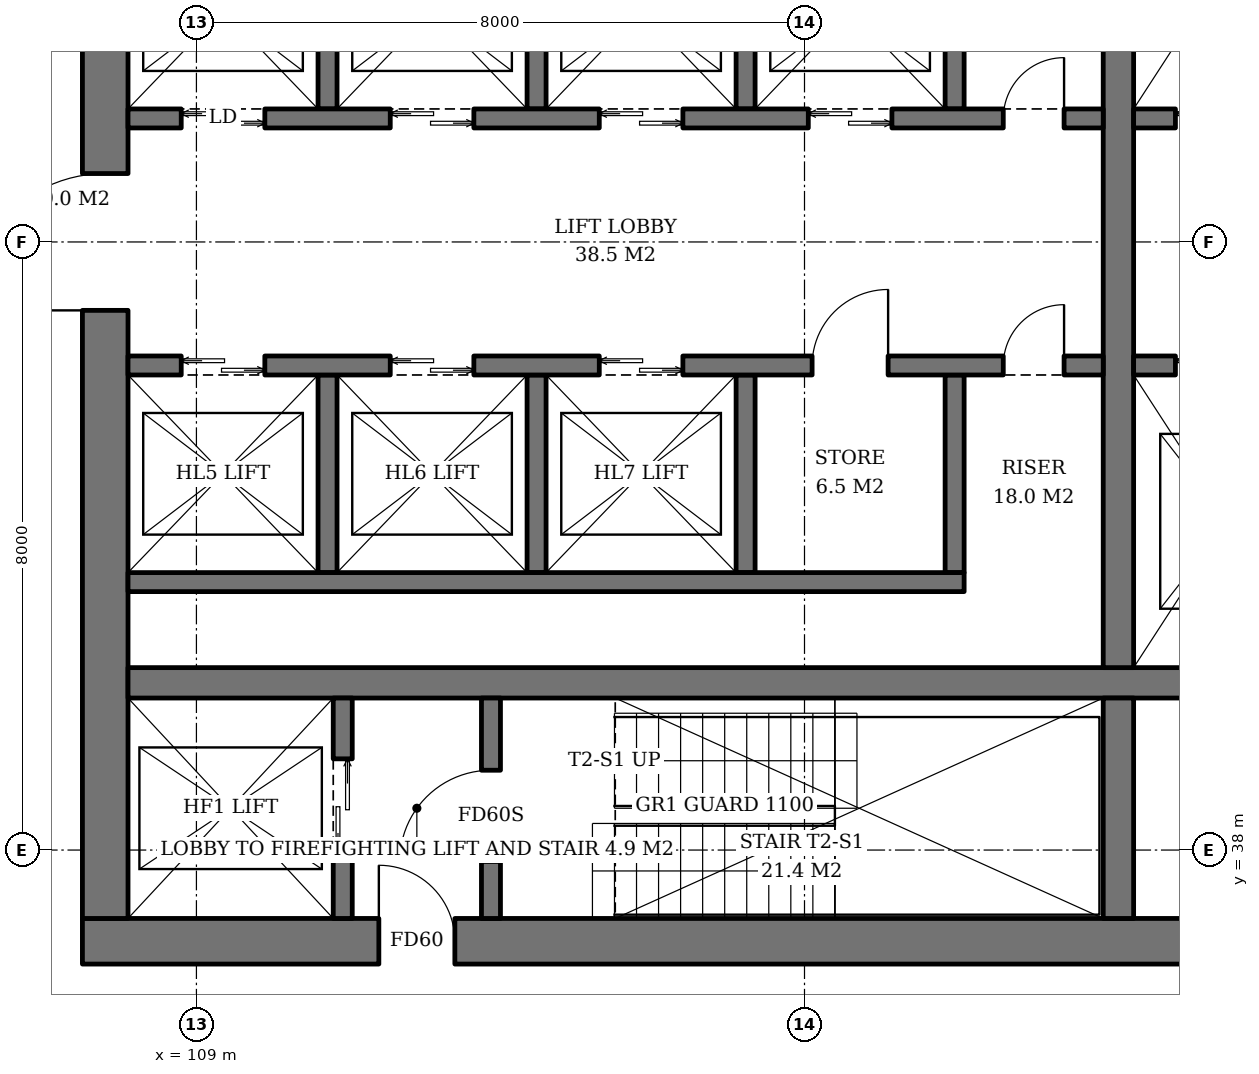
"""IFC4 building model, lengths in metres.
Left out: names, types, materials, properties, quantities, classifications, styles, units other than length and angle.
Written with IfcOpenShell. Run it as: python <this file> out.ifc"""

import sys

from ifc_helpers import new_model, si_unit, direction, frame, frame_2d, origin, place, context, subcontext, project, spatial, rectangle, extrude, element, fill, save


model = new_model("IFC4")
c1 = context("Model", 3, precision=1e-05, world=origin(), true_north=direction((0.0, 1.0)))
c2 = subcontext(c1, "Body", "Model", "MODEL_VIEW")
j1 = project(units=[si_unit("LENGTHUNIT", "METRE"), si_unit("PLANEANGLEUNIT", "RADIAN")], contexts=[c1])
p1 = place(None, origin())
s1 = spatial("IfcSite", under=j1, at=p1, CompositionType="ELEMENT")
p2 = place(p1, origin())
s2 = spatial("IfcBuilding", under=s1, at=p2, CompositionType="ELEMENT")
p3 = place(p2, frame((0.0, 0.0, 123.6)))
s3 = spatial("IfcBuildingStorey", under=s2, at=p3, CompositionType="ELEMENT", Elevation=123.6)
p4 = place(p3, frame((107.5, 36.8, 0.0), z_axis=(0.0, 0.0, 1.0), x_axis=(1.0, 0.0, 0.0)))
e1 = element("IfcWall", 1, at=p4, inside=s3, PredefinedType="SHEAR", context=c2, shape_type="SweptSolid", body=[
    extrude(rectangle(XDim=19.0, YDim=0.6, at=frame_2d((9.5, 0.0))), origin(), (0.0, 0.0, 1.0), 3.8),
])
p5 = place(p4, frame((3.9, 0.0, 0.0)))
e2 = element("IfcOpeningElement", 2, at=p5, cuts=e1, PredefinedType="OPENING", context=c2, shape_type="SweptSolid", body=[
    extrude(rectangle(XDim=1.0, YDim=2.1, at=frame_2d((0.5, 1.05))), frame((0.0, 0.31, 0.0), z_axis=(0.0, -1.0, 0.0), x_axis=(1.0, 0.0, 0.0)), (0.0, 0.0, 1.0), 0.62),
])
p6 = place(p4, frame((15.615, 0.0, 0.0)))
e3 = element("IfcOpeningElement", 3, at=p6, cuts=e1, PredefinedType="OPENING", context=c2, shape_type="SweptSolid", body=[
    extrude(rectangle(XDim=1.0, YDim=2.1, at=frame_2d((0.5, 1.05))), frame((0.0, 0.31, 0.0), z_axis=(0.0, -1.0, 0.0), x_axis=(1.0, 0.0, 0.0)), (0.0, 0.0, 1.0), 0.62),
])
p7 = place(p3, frame((107.8, 37.1, 0.0), z_axis=(0.0, 0.0, 1.0), x_axis=(0.0, 1.0, 0.0)))
e4 = element("IfcWall", 4, at=p7, inside=s3, PredefinedType="SHEAR", context=c2, shape_type="SweptSolid", body=[
    extrude(rectangle(XDim=17.8, YDim=0.6, at=frame_2d((8.9, 0.0))), origin(), (0.0, 0.0, 1.0), 3.8),
])
p8 = place(p7, frame((8.0, 0.0, 0.0)))
e5 = element("IfcOpeningElement", 5, at=p8, cuts=e4, PredefinedType="OPENING", context=c2, shape_type="SweptSolid", body=[
    extrude(rectangle(XDim=1.8, YDim=2.4, at=frame_2d((0.9, 1.2))), frame((0.0, 0.31, 0.0), z_axis=(0.0, -1.0, 0.0), x_axis=(1.0, 0.0, 0.0)), (0.0, 0.0, 1.0), 0.62),
])
p9 = place(p3, frame((108.1, 40.2, 0.0), z_axis=(0.0, 0.0, 1.0), x_axis=(1.0, 0.0, 0.0)))
e6 = element("IfcWall", 6, at=p9, inside=s3, PredefinedType="SHEAR", context=c2, shape_type="SweptSolid", body=[
    extrude(rectangle(XDim=17.8, YDim=0.4, at=frame_2d((8.9, 0.0))), origin(), (0.0, 0.0, 1.0), 3.8),
])
p10 = place(p3, frame((121.13, 37.1, 0.0), z_axis=(0.0, 0.0, 1.0), x_axis=(0.0, 1.0, 0.0)))
e7 = element("IfcWall", 7, at=p10, inside=s3, PredefinedType="SHEAR", context=c2, shape_type="SweptSolid", body=[
    extrude(rectangle(XDim=2.9, YDim=0.4, at=frame_2d((1.45, 0.0))), origin(), (0.0, 0.0, 1.0), 3.8),
])
p11 = place(p3, frame((121.13, 40.4, 0.0), z_axis=(0.0, 0.0, 1.0), x_axis=(0.0, 1.0, 0.0)))
e8 = element("IfcWall", 8, at=p11, inside=s3, PredefinedType="SHEAR", context=c2, shape_type="SweptSolid", body=[
    extrude(rectangle(XDim=11.2, YDim=0.4, at=frame_2d((5.6, 0.0))), origin(), (0.0, 0.0, 1.0), 3.8),
])
p12 = place(p3, frame((110.925, 37.1, 0.0), z_axis=(0.0, 0.0, 1.0), x_axis=(0.0, 1.0, 0.0)))
e9 = element("IfcWall", 9, at=p12, inside=s3, PredefinedType="SHEAR", context=c2, shape_type="SweptSolid", body=[
    extrude(rectangle(XDim=2.9, YDim=0.25, at=frame_2d((1.45, 0.0))), origin(), (0.0, 0.0, 1.0), 3.8),
])
p13 = place(p12, frame((0.8, 0.0, 0.0)))
e10 = element("IfcOpeningElement", 10, at=p13, cuts=e9, PredefinedType="OPENING", context=c2, shape_type="SweptSolid", body=[
    extrude(rectangle(XDim=1.3, YDim=2.2, at=frame_2d((0.65, 1.1))), frame((0.0, 0.135, 0.0), z_axis=(0.0, -1.0, 0.0), x_axis=(1.0, 0.0, 0.0)), (0.0, 0.0, 1.0), 0.27),
])
p14 = place(p3, frame((112.875, 37.1, 0.0), z_axis=(0.0, 0.0, 1.0), x_axis=(0.0, 1.0, 0.0)))
e11 = element("IfcWall", 11, at=p14, inside=s3, PredefinedType="SHEAR", context=c2, shape_type="SweptSolid", body=[
    extrude(rectangle(XDim=2.9, YDim=0.25, at=frame_2d((1.45, 0.0))), origin(), (0.0, 0.0, 1.0), 3.8),
])
p15 = place(p14, frame((0.75, 0.0, 0.0)))
e12 = element("IfcOpeningElement", 12, at=p15, cuts=e11, PredefinedType="OPENING", context=c2, shape_type="SweptSolid", body=[
    extrude(rectangle(XDim=1.2, YDim=2.1, at=frame_2d((0.6, 1.05))), frame((0.0, 0.135, 0.0), z_axis=(0.0, -1.0, 0.0), x_axis=(1.0, 0.0, 0.0)), (0.0, 0.0, 1.0), 0.27),
])
for number, where, z_axis, x_axis in (
    (13, (110.725, 47.75, 0.0), (0.0, 0.0, 1.0), (0.0, 1.0, 0.0)),
    (14, (113.475, 47.75, 0.0), (0.0, 0.0, 1.0), (0.0, 1.0, 0.0)),
    (15, (116.225, 47.75, 0.0), (0.0, 0.0, 1.0), (0.0, 1.0, 0.0)),
    (16, (118.975, 47.75, 0.0), (0.0, 0.0, 1.0), (0.0, 1.0, 0.0)),
):
    element("IfcWall", number, at=place(p3, frame(where, z_axis=z_axis, x_axis=x_axis)), inside=s3, PredefinedType="SHEAR", context=c2, shape_type="SweptSolid", body=[
        extrude(rectangle(XDim=2.6, YDim=0.25, at=frame_2d((1.3, 0.0))), origin(), (0.0, 0.0, 1.0), 3.8),
    ])
p16 = place(p3, frame((108.1, 47.625, 0.0), z_axis=(0.0, 0.0, 1.0), x_axis=(1.0, 0.0, 0.0)))
e17 = element("IfcWall", 17, at=p16, inside=s3, PredefinedType="SHEAR", context=c2, shape_type="SweptSolid", body=[
    extrude(rectangle(XDim=12.83, YDim=0.25, at=frame_2d((6.415, 0.0))), origin(), (0.0, 0.0, 1.0), 3.8),
])
p17 = place(p16, frame((0.7, 0.0, 0.0)))
e18 = element("IfcOpeningElement", 18, at=p17, cuts=e17, PredefinedType="OPENING", context=c2, shape_type="SweptSolid", body=[
    extrude(rectangle(XDim=1.1, YDim=2.2, at=frame_2d((0.55, 1.1))), frame((0.0, 0.135, 0.0), z_axis=(0.0, -1.0, 0.0), x_axis=(1.0, 0.0, 0.0)), (0.0, 0.0, 1.0), 0.27),
])
p18 = place(p16, frame((3.45, 0.0, 0.0)))
e19 = element("IfcOpeningElement", 19, at=p18, cuts=e17, PredefinedType="OPENING", context=c2, shape_type="SweptSolid", body=[
    extrude(rectangle(XDim=1.1, YDim=2.2, at=frame_2d((0.55, 1.1))), frame((0.0, 0.135, 0.0), z_axis=(0.0, -1.0, 0.0), x_axis=(1.0, 0.0, 0.0)), (0.0, 0.0, 1.0), 0.27),
])
p19 = place(p16, frame((6.2, 0.0, 0.0)))
e20 = element("IfcOpeningElement", 20, at=p19, cuts=e17, PredefinedType="OPENING", context=c2, shape_type="SweptSolid", body=[
    extrude(rectangle(XDim=1.1, YDim=2.2, at=frame_2d((0.55, 1.1))), frame((0.0, 0.135, 0.0), z_axis=(0.0, -1.0, 0.0), x_axis=(1.0, 0.0, 0.0)), (0.0, 0.0, 1.0), 0.27),
])
p20 = place(p16, frame((8.95, 0.0, 0.0)))
e21 = element("IfcOpeningElement", 21, at=p20, cuts=e17, PredefinedType="OPENING", context=c2, shape_type="SweptSolid", body=[
    extrude(rectangle(XDim=1.1, YDim=2.2, at=frame_2d((0.55, 1.1))), frame((0.0, 0.135, 0.0), z_axis=(0.0, -1.0, 0.0), x_axis=(1.0, 0.0, 0.0)), (0.0, 0.0, 1.0), 0.27),
])
p21 = place(p16, frame((11.515, 0.0, 0.0)))
e22 = element("IfcOpeningElement", 22, at=p21, cuts=e17, PredefinedType="OPENING", context=c2, shape_type="SweptSolid", body=[
    extrude(rectangle(XDim=0.8, YDim=2.0, at=frame_2d((0.4, 1.0))), frame((0.0, 0.135, 0.0), z_axis=(0.0, -1.0, 0.0), x_axis=(1.0, 0.0, 0.0)), (0.0, 0.0, 1.0), 0.27),
])
for number, where, z_axis, x_axis in (
    (23, (110.725, 44.25, 0.0), (0.0, 0.0, 1.0), (0.0, -1.0, 0.0)),
    (24, (113.475, 44.25, 0.0), (0.0, 0.0, 1.0), (0.0, -1.0, 0.0)),
    (25, (116.225, 44.25, 0.0), (0.0, 0.0, 1.0), (0.0, -1.0, 0.0)),
    (26, (118.975, 44.25, 0.0), (0.0, 0.0, 1.0), (0.0, -1.0, 0.0)),
):
    element("IfcWall", number, at=place(p3, frame(where, z_axis=z_axis, x_axis=x_axis)), inside=s3, PredefinedType="SHEAR", context=c2, shape_type="SweptSolid", body=[
        extrude(rectangle(XDim=2.6, YDim=0.25, at=frame_2d((1.3, 0.0))), origin(), (0.0, 0.0, 1.0), 3.8),
    ])
p22 = place(p3, frame((108.1, 41.525, 0.0), z_axis=(0.0, 0.0, 1.0), x_axis=(1.0, 0.0, 0.0)))
e27 = element("IfcWall", 27, at=p22, inside=s3, PredefinedType="SHEAR", context=c2, shape_type="SweptSolid", body=[
    extrude(rectangle(XDim=11.0, YDim=0.25, at=frame_2d((5.5, 0.0))), origin(), (0.0, 0.0, 1.0), 3.8),
])
p23 = place(p3, frame((108.1, 44.375, 0.0), z_axis=(0.0, 0.0, 1.0), x_axis=(1.0, 0.0, 0.0)))
e28 = element("IfcWall", 28, at=p23, inside=s3, PredefinedType="SHEAR", context=c2, shape_type="SweptSolid", body=[
    extrude(rectangle(XDim=12.83, YDim=0.25, at=frame_2d((6.415, 0.0))), origin(), (0.0, 0.0, 1.0), 3.8),
])
p24 = place(p23, frame((0.7, 0.0, 0.0)))
e29 = element("IfcOpeningElement", 29, at=p24, cuts=e28, PredefinedType="OPENING", context=c2, shape_type="SweptSolid", body=[
    extrude(rectangle(XDim=1.1, YDim=2.2, at=frame_2d((0.55, 1.1))), frame((0.0, 0.135, 0.0), z_axis=(0.0, -1.0, 0.0), x_axis=(1.0, 0.0, 0.0)), (0.0, 0.0, 1.0), 0.27),
])
p25 = place(p23, frame((3.45, 0.0, 0.0)))
e30 = element("IfcOpeningElement", 30, at=p25, cuts=e28, PredefinedType="OPENING", context=c2, shape_type="SweptSolid", body=[
    extrude(rectangle(XDim=1.1, YDim=2.2, at=frame_2d((0.55, 1.1))), frame((0.0, 0.135, 0.0), z_axis=(0.0, -1.0, 0.0), x_axis=(1.0, 0.0, 0.0)), (0.0, 0.0, 1.0), 0.27),
])
p26 = place(p23, frame((6.2, 0.0, 0.0)))
e31 = element("IfcOpeningElement", 31, at=p26, cuts=e28, PredefinedType="OPENING", context=c2, shape_type="SweptSolid", body=[
    extrude(rectangle(XDim=1.1, YDim=2.2, at=frame_2d((0.55, 1.1))), frame((0.0, 0.135, 0.0), z_axis=(0.0, -1.0, 0.0), x_axis=(1.0, 0.0, 0.0)), (0.0, 0.0, 1.0), 0.27),
])
p27 = place(p23, frame((9.0, 0.0, 0.0)))
e32 = element("IfcOpeningElement", 32, at=p27, cuts=e28, PredefinedType="OPENING", context=c2, shape_type="SweptSolid", body=[
    extrude(rectangle(XDim=1.0, YDim=2.1, at=frame_2d((0.5, 1.05))), frame((0.0, 0.135, 0.0), z_axis=(0.0, -1.0, 0.0), x_axis=(1.0, 0.0, 0.0)), (0.0, 0.0, 1.0), 0.27),
])
p28 = place(p23, frame((11.515, 0.0, 0.0)))
e33 = element("IfcOpeningElement", 33, at=p28, cuts=e28, PredefinedType="OPENING", context=c2, shape_type="SweptSolid", body=[
    extrude(rectangle(XDim=0.8, YDim=2.0, at=frame_2d((0.4, 1.0))), frame((0.0, 0.135, 0.0), z_axis=(0.0, -1.0, 0.0), x_axis=(1.0, 0.0, 0.0)), (0.0, 0.0, 1.0), 0.27),
])
p29 = place(p3, frame((121.33, 47.625, 0.0), z_axis=(0.0, 0.0, 1.0), x_axis=(1.0, 0.0, 0.0)))
e34 = element("IfcWall", 34, at=p29, inside=s3, PredefinedType="SHEAR", context=c2, shape_type="SweptSolid", body=[
    extrude(rectangle(XDim=4.57, YDim=0.25, at=frame_2d((2.285, 0.0))), origin(), (0.0, 0.0, 1.0), 3.8),
])
p30 = place(p29, frame((0.55, 0.0, 0.0)))
e35 = element("IfcOpeningElement", 35, at=p30, cuts=e34, PredefinedType="OPENING", context=c2, shape_type="SweptSolid", body=[
    extrude(rectangle(XDim=1.4, YDim=2.4, at=frame_2d((0.7, 1.2))), frame((0.0, 0.135, 0.0), z_axis=(0.0, -1.0, 0.0), x_axis=(1.0, 0.0, 0.0)), (0.0, 0.0, 1.0), 0.27),
])
p31 = place(p29, frame((3.26, 0.0, 0.0)))
e36 = element("IfcOpeningElement", 36, at=p31, cuts=e34, PredefinedType="OPENING", context=c2, shape_type="SweptSolid", body=[
    extrude(rectangle(XDim=0.8, YDim=2.0, at=frame_2d((0.4, 1.0))), frame((0.0, 0.135, 0.0), z_axis=(0.0, -1.0, 0.0), x_axis=(1.0, 0.0, 0.0)), (0.0, 0.0, 1.0), 0.27),
])
p32 = place(p3, frame((121.33, 44.375, 0.0), z_axis=(0.0, 0.0, 1.0), x_axis=(1.0, 0.0, 0.0)))
e37 = element("IfcWall", 37, at=p32, inside=s3, PredefinedType="SHEAR", context=c2, shape_type="SweptSolid", body=[
    extrude(rectangle(XDim=4.57, YDim=0.25, at=frame_2d((2.285, 0.0))), origin(), (0.0, 0.0, 1.0), 3.8),
])
p33 = place(p32, frame((0.55, 0.0, 0.0)))
e38 = element("IfcOpeningElement", 38, at=p33, cuts=e37, PredefinedType="OPENING", context=c2, shape_type="SweptSolid", body=[
    extrude(rectangle(XDim=1.4, YDim=2.4, at=frame_2d((0.7, 1.2))), frame((0.0, 0.135, 0.0), z_axis=(0.0, -1.0, 0.0), x_axis=(1.0, 0.0, 0.0)), (0.0, 0.0, 1.0), 0.27),
])
p34 = place(p32, frame((3.26, 0.0, 0.0)))
e39 = element("IfcOpeningElement", 39, at=p34, cuts=e37, PredefinedType="OPENING", context=c2, shape_type="SweptSolid", body=[
    extrude(rectangle(XDim=0.8, YDim=2.0, at=frame_2d((0.4, 1.0))), frame((0.0, 0.135, 0.0), z_axis=(0.0, -1.0, 0.0), x_axis=(1.0, 0.0, 0.0)), (0.0, 0.0, 1.0), 0.27),
])
p35 = place(p13, origin())
e40 = element("IfcDoor", 40, at=p35, inside=s3, OperationType="DOUBLE_DOOR_SLIDING", PredefinedType="DOOR", context=c2, shape_type="SweptSolid", body=[
    extrude(rectangle(XDim=1.3, YDim=2.2, at=frame_2d((0.65, 1.1))), frame((0.0, 0.025, 0.0), z_axis=(0.0, -1.0, 0.0), x_axis=(1.0, 0.0, 0.0)), (0.0, 0.0, 1.0), 0.05),
])
fill(e10, e40)
p36 = place(p15, origin())
e41 = element("IfcDoor", 41, at=p36, inside=s3, OperationType="SINGLE_SWING_LEFT", PredefinedType="DOOR", context=c2, shape_type="SweptSolid", body=[
    extrude(rectangle(XDim=1.2, YDim=2.1, at=frame_2d((0.6, 1.05))), frame((0.0, 0.025, 0.0), z_axis=(0.0, -1.0, 0.0), x_axis=(1.0, 0.0, 0.0)), (0.0, 0.0, 1.0), 0.05),
])
fill(e12, e41)
p37 = place(p17, origin())
e42 = element("IfcDoor", 42, at=p37, inside=s3, OperationType="DOUBLE_DOOR_SLIDING", PredefinedType="DOOR", context=c2, shape_type="SweptSolid", body=[
    extrude(rectangle(XDim=1.1, YDim=2.2, at=frame_2d((0.55, 1.1))), frame((0.0, 0.025, 0.0), z_axis=(0.0, -1.0, 0.0), x_axis=(1.0, 0.0, 0.0)), (0.0, 0.0, 1.0), 0.05),
])
fill(e18, e42)
p38 = place(p18, origin())
e43 = element("IfcDoor", 43, at=p38, inside=s3, OperationType="DOUBLE_DOOR_SLIDING", PredefinedType="DOOR", context=c2, shape_type="SweptSolid", body=[
    extrude(rectangle(XDim=1.1, YDim=2.2, at=frame_2d((0.55, 1.1))), frame((0.0, 0.025, 0.0), z_axis=(0.0, -1.0, 0.0), x_axis=(1.0, 0.0, 0.0)), (0.0, 0.0, 1.0), 0.05),
])
fill(e19, e43)
p39 = place(p19, origin())
e44 = element("IfcDoor", 44, at=p39, inside=s3, OperationType="DOUBLE_DOOR_SLIDING", PredefinedType="DOOR", context=c2, shape_type="SweptSolid", body=[
    extrude(rectangle(XDim=1.1, YDim=2.2, at=frame_2d((0.55, 1.1))), frame((0.0, 0.025, 0.0), z_axis=(0.0, -1.0, 0.0), x_axis=(1.0, 0.0, 0.0)), (0.0, 0.0, 1.0), 0.05),
])
fill(e20, e44)
p40 = place(p20, origin())
e45 = element("IfcDoor", 45, at=p40, inside=s3, OperationType="DOUBLE_DOOR_SLIDING", PredefinedType="DOOR", context=c2, shape_type="SweptSolid", body=[
    extrude(rectangle(XDim=1.1, YDim=2.2, at=frame_2d((0.55, 1.1))), frame((0.0, 0.025, 0.0), z_axis=(0.0, -1.0, 0.0), x_axis=(1.0, 0.0, 0.0)), (0.0, 0.0, 1.0), 0.05),
])
fill(e21, e45)
p41 = place(p21, origin())
e46 = element("IfcDoor", 46, at=p41, inside=s3, OperationType="SINGLE_SWING_RIGHT", PredefinedType="DOOR", context=c2, shape_type="SweptSolid", body=[
    extrude(rectangle(XDim=0.8, YDim=2.0, at=frame_2d((0.4, 1.0))), frame((0.0, 0.025, 0.0), z_axis=(0.0, -1.0, 0.0), x_axis=(1.0, 0.0, 0.0)), (0.0, 0.0, 1.0), 0.05),
])
fill(e22, e46)
p42 = place(p24, origin())
e47 = element("IfcDoor", 47, at=p42, inside=s3, OperationType="DOUBLE_DOOR_SLIDING", PredefinedType="DOOR", context=c2, shape_type="SweptSolid", body=[
    extrude(rectangle(XDim=1.1, YDim=2.2, at=frame_2d((0.55, 1.1))), frame((0.0, 0.025, 0.0), z_axis=(0.0, -1.0, 0.0), x_axis=(1.0, 0.0, 0.0)), (0.0, 0.0, 1.0), 0.05),
])
fill(e29, e47)
p43 = place(p25, origin())
e48 = element("IfcDoor", 48, at=p43, inside=s3, OperationType="DOUBLE_DOOR_SLIDING", PredefinedType="DOOR", context=c2, shape_type="SweptSolid", body=[
    extrude(rectangle(XDim=1.1, YDim=2.2, at=frame_2d((0.55, 1.1))), frame((0.0, 0.025, 0.0), z_axis=(0.0, -1.0, 0.0), x_axis=(1.0, 0.0, 0.0)), (0.0, 0.0, 1.0), 0.05),
])
fill(e30, e48)
p44 = place(p26, origin())
e49 = element("IfcDoor", 49, at=p44, inside=s3, OperationType="DOUBLE_DOOR_SLIDING", PredefinedType="DOOR", context=c2, shape_type="SweptSolid", body=[
    extrude(rectangle(XDim=1.1, YDim=2.2, at=frame_2d((0.55, 1.1))), frame((0.0, 0.025, 0.0), z_axis=(0.0, -1.0, 0.0), x_axis=(1.0, 0.0, 0.0)), (0.0, 0.0, 1.0), 0.05),
])
fill(e31, e49)
p45 = place(p27, origin())
e50 = element("IfcDoor", 50, at=p45, inside=s3, OperationType="SINGLE_SWING_RIGHT", PredefinedType="DOOR", context=c2, shape_type="SweptSolid", body=[
    extrude(rectangle(XDim=1.0, YDim=2.1, at=frame_2d((0.5, 1.05))), frame((0.0, 0.025, 0.0), z_axis=(0.0, -1.0, 0.0), x_axis=(1.0, 0.0, 0.0)), (0.0, 0.0, 1.0), 0.05),
])
fill(e32, e50)
p46 = place(p28, origin())
e51 = element("IfcDoor", 51, at=p46, inside=s3, OperationType="SINGLE_SWING_RIGHT", PredefinedType="DOOR", context=c2, shape_type="SweptSolid", body=[
    extrude(rectangle(XDim=0.8, YDim=2.0, at=frame_2d((0.4, 1.0))), frame((0.0, 0.025, 0.0), z_axis=(0.0, -1.0, 0.0), x_axis=(1.0, 0.0, 0.0)), (0.0, 0.0, 1.0), 0.05),
])
fill(e33, e51)
p47 = place(p30, origin())
e52 = element("IfcDoor", 52, at=p47, inside=s3, OperationType="DOUBLE_DOOR_SLIDING", PredefinedType="DOOR", context=c2, shape_type="SweptSolid", body=[
    extrude(rectangle(XDim=1.4, YDim=2.4, at=frame_2d((0.7, 1.2))), frame((0.0, 0.025, 0.0), z_axis=(0.0, -1.0, 0.0), x_axis=(1.0, 0.0, 0.0)), (0.0, 0.0, 1.0), 0.05),
])
fill(e35, e52)
p48 = place(p33, origin())
e53 = element("IfcDoor", 53, at=p48, inside=s3, OperationType="DOUBLE_DOOR_SLIDING", PredefinedType="DOOR", context=c2, shape_type="SweptSolid", body=[
    extrude(rectangle(XDim=1.4, YDim=2.4, at=frame_2d((0.7, 1.2))), frame((0.0, 0.025, 0.0), z_axis=(0.0, -1.0, 0.0), x_axis=(1.0, 0.0, 0.0)), (0.0, 0.0, 1.0), 0.05),
])
fill(e38, e53)
p49 = place(p5, origin())
e54 = element("IfcDoor", 54, at=p49, inside=s3, OperationType="SINGLE_SWING_LEFT", PredefinedType="DOOR", context=c2, shape_type="SweptSolid", body=[
    extrude(rectangle(XDim=1.0, YDim=2.1, at=frame_2d((0.5, 1.05))), frame((0.0, 0.025, 0.0), z_axis=(0.0, -1.0, 0.0), x_axis=(1.0, 0.0, 0.0)), (0.0, 0.0, 1.0), 0.05),
])
fill(e2, e54)
p50 = place(p8, origin())
e55 = element("IfcDoor", 55, at=p50, inside=s3, OperationType="DOUBLE_DOOR_SINGLE_SWING", PredefinedType="DOOR", context=c2, shape_type="SweptSolid", body=[
    extrude(rectangle(XDim=1.8, YDim=2.4, at=frame_2d((0.9, 1.2))), frame((0.0, 0.025, 0.0), z_axis=(0.0, -1.0, 0.0), x_axis=(1.0, 0.0, 0.0)), (0.0, 0.0, 1.0), 0.05),
])
fill(e5, e55)
save(model, sys.argv[1])
